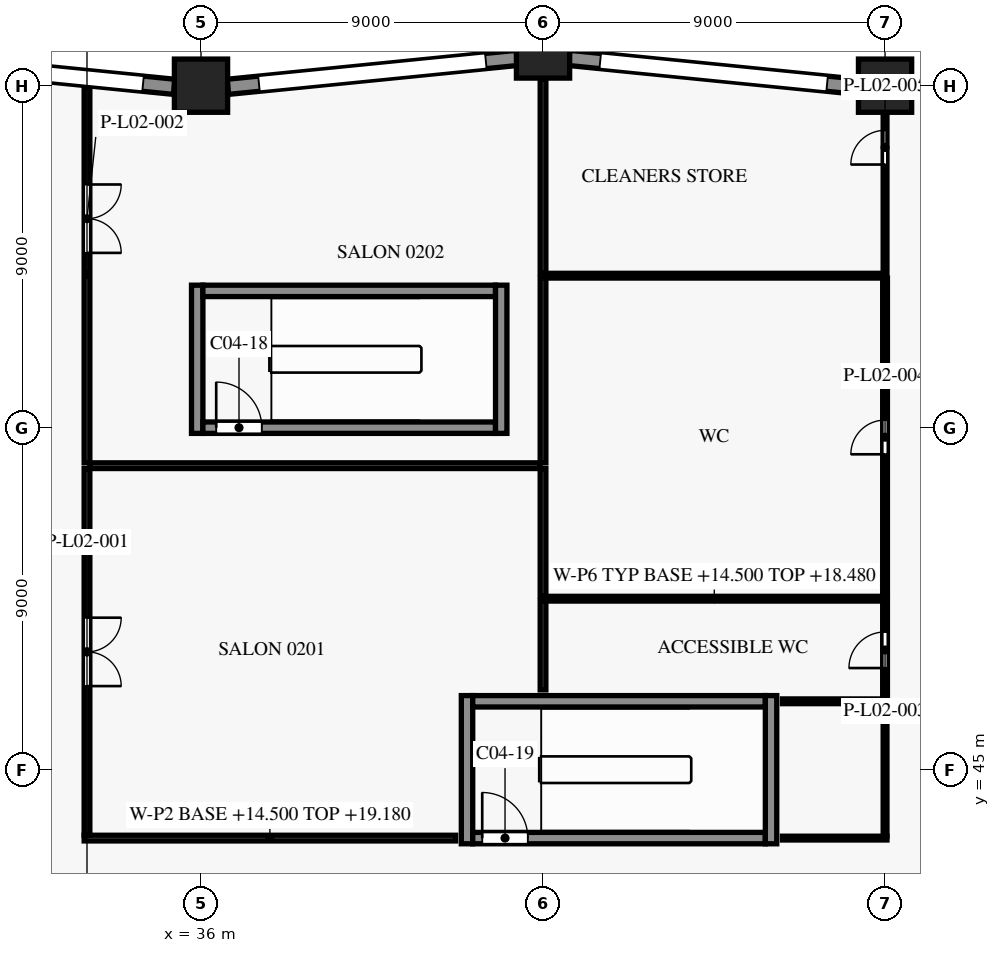
"""IFC4 building model, lengths in metres.
Left out: names, types, materials, properties, quantities, classifications, styles, units other than length and angle.
Written with IfcOpenShell. Run it as: python <this file> out.ifc"""

import sys

from ifc_helpers import new_model, si_unit, direction, frame, frame_2d, origin, origin_2d, place, context, subcontext, project, spatial, rectangle, extrude, element, fill, save


model = new_model("IFC4")
c1 = context("Model", 3, precision=1e-05, world=origin(), true_north=direction((0.0, 1.0)))
c2 = subcontext(c1, "Body", "Model", "MODEL_VIEW")
j1 = project(units=[si_unit("LENGTHUNIT", "METRE"), si_unit("PLANEANGLEUNIT", "RADIAN")], contexts=[c1])
p1 = place(None, origin())
s1 = spatial("IfcSite", under=j1, at=p1, CompositionType="ELEMENT")
p2 = place(p1, origin())
s2 = spatial("IfcBuilding", under=s1, at=p2, CompositionType="ELEMENT")
p3 = place(p2, frame((0.0, 0.0, 14.5)))
s3 = spatial("IfcBuildingStorey", under=s2, at=p3, CompositionType="ELEMENT", Elevation=14.5)
for number, where, z_axis, x_axis in (
    (1, (54.0, 63.0, 0.0), (0.0, 0.0, 1.0), (1.0, 0.0, 0.0)),
    (2, (45.0, 63.9, 0.0), (0.0, 0.0, 1.0), (1.0, 0.0, 0.0)),
    (3, (36.0, 63.0, 0.0), (0.0, 0.0, 1.0), (1.0, 0.0, 0.0)),
):
    element("IfcColumn", number, at=place(p3, frame(where, z_axis=z_axis, x_axis=x_axis)), inside=s3, PredefinedType="COLUMN", context=c2, shape_type="SweptSolid", body=[
        extrude(rectangle(XDim=1.4, YDim=1.4, at=origin_2d()), origin(), (0.0, 0.0, 1.0), 5.0),
    ])
p4 = place(p3, frame((54.707, 62.97, 0.0), z_axis=(0.0, 0.0, 1.0), x_axis=(0.995039719416, 0.099478423711, 0.0)))
e4 = element("IfcWall", 4, at=p4, inside=s3, PredefinedType="SOLIDWALL", context=c2, shape_type="SweptSolid", body=[
    extrude(rectangle(XDim=7.645, YDim=0.4, at=frame_2d((3.822, 0.0))), origin(), (0.0, 0.0, 1.0), 4.1),
])
p5 = place(p4, frame((0.823, 0.0, 0.9)))
e5 = element("IfcOpeningElement", 5, at=p5, cuts=e4, PredefinedType="OPENING", context=c2, shape_type="SweptSolid", body=[
    extrude(rectangle(XDim=6.0, YDim=1.8, at=frame_2d((3.0, 0.9))), frame((0.0, 0.21, 0.0), z_axis=(0.0, -1.0, 0.0), x_axis=(1.0, 0.0, 0.0)), (0.0, 0.0, 1.0), 0.42),
])
p6 = place(p3, frame((45.687, 63.731, 0.0), z_axis=(0.0, 0.0, 1.0), x_axis=(0.995039719416, -0.099478423711, 0.0)))
e6 = element("IfcWall", 6, at=p6, inside=s3, PredefinedType="SOLIDWALL", context=c2, shape_type="SweptSolid", body=[
    extrude(rectangle(XDim=7.645, YDim=0.4, at=frame_2d((3.822, 0.0))), origin(), (0.0, 0.0, 1.0), 4.1),
])
p7 = place(p6, frame((0.823, 0.0, 0.9)))
e7 = element("IfcOpeningElement", 7, at=p7, cuts=e6, PredefinedType="OPENING", context=c2, shape_type="SweptSolid", body=[
    extrude(rectangle(XDim=6.0, YDim=1.8, at=frame_2d((3.0, 0.9))), frame((0.0, 0.21, 0.0), z_axis=(0.0, -1.0, 0.0), x_axis=(1.0, 0.0, 0.0)), (0.0, 0.0, 1.0), 0.42),
])
p8 = place(p3, frame((36.707, 62.97, 0.0), z_axis=(0.0, 0.0, 1.0), x_axis=(0.995039719416, 0.099478423711, 0.0)))
e8 = element("IfcWall", 8, at=p8, inside=s3, PredefinedType="SOLIDWALL", context=c2, shape_type="SweptSolid", body=[
    extrude(rectangle(XDim=7.645, YDim=0.4, at=frame_2d((3.822, 0.0))), origin(), (0.0, 0.0, 1.0), 4.1),
])
p9 = place(p8, frame((0.823, 0.0, 0.9)))
e9 = element("IfcOpeningElement", 9, at=p9, cuts=e8, PredefinedType="OPENING", context=c2, shape_type="SweptSolid", body=[
    extrude(rectangle(XDim=6.0, YDim=1.8, at=frame_2d((3.0, 0.9))), frame((0.0, 0.21, 0.0), z_axis=(0.0, -1.0, 0.0), x_axis=(1.0, 0.0, 0.0)), (0.0, 0.0, 1.0), 0.42),
])
p10 = place(p3, frame((27.687, 63.731, 0.0), z_axis=(0.0, 0.0, 1.0), x_axis=(0.995039719416, -0.099478423711, 0.0)))
e10 = element("IfcWall", 10, at=p10, inside=s3, PredefinedType="SOLIDWALL", context=c2, shape_type="SweptSolid", body=[
    extrude(rectangle(XDim=7.645, YDim=0.4, at=frame_2d((3.822, 0.0))), origin(), (0.0, 0.0, 1.0), 4.1),
])
p11 = place(p10, frame((0.823, 0.0, 0.9)))
e11 = element("IfcOpeningElement", 11, at=p11, cuts=e10, PredefinedType="OPENING", context=c2, shape_type="SweptSolid", body=[
    extrude(rectangle(XDim=6.0, YDim=1.8, at=frame_2d((3.0, 0.9))), frame((0.0, 0.21, 0.0), z_axis=(0.0, -1.0, 0.0), x_axis=(1.0, 0.0, 0.0)), (0.0, 0.0, 1.0), 0.42),
])
p12 = place(p3, frame((43.15, 43.2, 0.0), z_axis=(0.0, 0.0, 1.0), x_axis=(1.0, 0.0, 0.0)))
e12 = element("IfcWall", 12, at=p12, inside=s3, PredefinedType="SHEAR", context=c2, shape_type="SweptSolid", body=[
    extrude(rectangle(XDim=7.7, YDim=0.3, at=frame_2d((3.85, 0.0))), origin(), (0.0, 0.0, 1.0), 4.7),
])
p13 = place(p12, frame((0.25, 0.0, 0.0)))
e13 = element("IfcOpeningElement", 13, at=p13, cuts=e12, PredefinedType="OPENING", context=c2, shape_type="SweptSolid", body=[
    extrude(rectangle(XDim=1.2, YDim=2.2, at=frame_2d((0.6, 1.1))), frame((0.0, 0.16, 0.0), z_axis=(0.0, -1.0, 0.0), x_axis=(1.0, 0.0, 0.0)), (0.0, 0.0, 1.0), 0.32),
])
p14 = place(p3, frame((43.15, 46.8, 0.0), z_axis=(0.0, 0.0, 1.0), x_axis=(1.0, 0.0, 0.0)))
e14 = element("IfcWall", 14, at=p14, inside=s3, PredefinedType="SHEAR", context=c2, shape_type="SweptSolid", body=[
    extrude(rectangle(XDim=7.7, YDim=0.3, at=frame_2d((3.85, 0.0))), origin(), (0.0, 0.0, 1.0), 4.7),
])
p15 = place(p3, frame((36.05, 54.0, 0.0), z_axis=(0.0, 0.0, 1.0), x_axis=(1.0, 0.0, 0.0)))
e15 = element("IfcWall", 15, at=p15, inside=s3, PredefinedType="SHEAR", context=c2, shape_type="SweptSolid", body=[
    extrude(rectangle(XDim=7.7, YDim=0.3, at=frame_2d((3.85, 0.0))), origin(), (0.0, 0.0, 1.0), 4.7),
])
p16 = place(p15, frame((0.35, 0.0, 0.0)))
e16 = element("IfcOpeningElement", 16, at=p16, cuts=e15, PredefinedType="OPENING", context=c2, shape_type="SweptSolid", body=[
    extrude(rectangle(XDim=1.2, YDim=2.2, at=frame_2d((0.6, 1.1))), frame((0.0, 0.16, 0.0), z_axis=(0.0, -1.0, 0.0), x_axis=(1.0, 0.0, 0.0)), (0.0, 0.0, 1.0), 0.32),
])
p17 = place(p3, frame((36.05, 57.6, 0.0), z_axis=(0.0, 0.0, 1.0), x_axis=(1.0, 0.0, 0.0)))
e17 = element("IfcWall", 17, at=p17, inside=s3, PredefinedType="SHEAR", context=c2, shape_type="SweptSolid", body=[
    extrude(rectangle(XDim=7.7, YDim=0.3, at=frame_2d((3.85, 0.0))), origin(), (0.0, 0.0, 1.0), 4.7),
])
for number, where, z_axis, x_axis in (
    (18, (35.9, 53.85, 0.0), (0.0, 0.0, 1.0), (0.0, 1.0, 0.0)),
    (19, (43.0, 43.05, 0.0), (0.0, 0.0, 1.0), (0.0, 1.0, 0.0)),
    (20, (43.9, 53.85, 0.0), (0.0, 0.0, 1.0), (0.0, 1.0, 0.0)),
    (21, (51.0, 43.05, 0.0), (0.0, 0.0, 1.0), (0.0, 1.0, 0.0)),
):
    element("IfcWall", number, at=place(p3, frame(where, z_axis=z_axis, x_axis=x_axis)), inside=s3, PredefinedType="SHEAR", context=c2, shape_type="SweptSolid", body=[
        extrude(rectangle(XDim=3.9, YDim=0.3, at=frame_2d((1.95, 0.0))), origin(), (0.0, 0.0, 1.0), 4.7),
    ])
p18 = place(p3, frame((32.925, 43.2, 0.0), z_axis=(0.0, 0.0, 1.0), x_axis=(1.0, 0.0, 0.0)))
e22 = element("IfcWall", 22, at=p18, inside=s3, PredefinedType="PARTITIONING", context=c2, shape_type="SweptSolid", body=[
    extrude(rectangle(XDim=9.775, YDim=0.15, at=frame_2d((4.887, 0.0))), origin(), (0.0, 0.0, 1.0), 4.68),
])
p19 = place(p3, frame((51.3, 43.2, 0.0), z_axis=(0.0, 0.0, 1.0), x_axis=(1.0, 0.0, 0.0)))
e23 = element("IfcWall", 23, at=p19, inside=s3, PredefinedType="PARTITIONING", context=c2, shape_type="SweptSolid", body=[
    extrude(rectangle(XDim=2.75, YDim=0.1, at=frame_2d((1.375, 0.0))), origin(), (0.0, 0.0, 1.0), 3.98),
])
p20 = place(p3, frame((54.0, 43.25, 0.0), z_axis=(0.0, 0.0, 1.0), x_axis=(0.0, 1.0, 0.0)))
e24 = element("IfcWall", 24, at=p20, inside=s3, PredefinedType="PARTITIONING", context=c2, shape_type="SweptSolid", body=[
    extrude(rectangle(XDim=3.488, YDim=0.1, at=frame_2d((1.744, 0.0))), origin(), (0.0, 0.0, 1.0), 3.98),
])
p21 = place(p3, frame((53.938, 46.8, 0.0), z_axis=(0.0, 0.0, 1.0), x_axis=(-1.0, 0.0, 0.0)))
e25 = element("IfcWall", 25, at=p21, inside=s3, PredefinedType="PARTITIONING", context=c2, shape_type="SweptSolid", body=[
    extrude(rectangle(XDim=2.637, YDim=0.125, at=frame_2d((1.319, 0.0))), origin(), (0.0, 0.0, 1.0), 3.98),
])
p22 = place(p3, frame((54.0, 46.863, 0.0), z_axis=(0.0, 0.0, 1.0), x_axis=(0.0, 1.0, 0.0)))
e26 = element("IfcWall", 26, at=p22, inside=s3, PredefinedType="PARTITIONING", context=c2, shape_type="SweptSolid", body=[
    extrude(rectangle(XDim=2.575, YDim=0.125, at=frame_2d((1.288, 0.0))), origin(), (0.0, 0.0, 1.0), 3.98),
])
p23 = place(p22, frame((0.812, 0.0, 0.0)))
e27 = element("IfcOpeningElement", 27, at=p23, cuts=e26, PredefinedType="OPENING", context=c2, shape_type="SweptSolid", body=[
    extrude(rectangle(XDim=0.95, YDim=2.1, at=frame_2d((0.475, 1.05))), frame((0.0, 0.073, 0.0), z_axis=(0.0, -1.0, 0.0), x_axis=(1.0, 0.0, 0.0)), (0.0, 0.0, 1.0), 0.145),
])
p24 = place(p3, frame((45.0, 49.438, 0.0), z_axis=(0.0, 0.0, 1.0), x_axis=(0.0, -1.0, 0.0)))
e28 = element("IfcWall", 28, at=p24, inside=s3, PredefinedType="PARTITIONING", context=c2, shape_type="SweptSolid", body=[
    extrude(rectangle(XDim=2.337, YDim=0.15, at=frame_2d((1.169, 0.0))), origin(), (0.0, 0.0, 1.0), 3.98),
])
p25 = place(p3, frame((45.075, 49.5, 0.0), z_axis=(0.0, 0.0, 1.0), x_axis=(1.0, 0.0, 0.0)))
e29 = element("IfcWall", 29, at=p25, inside=s3, PredefinedType="PARTITIONING", context=c2, shape_type="SweptSolid", body=[
    extrude(rectangle(XDim=8.863, YDim=0.125, at=frame_2d((4.431, 0.0))), origin(), (0.0, 0.0, 1.0), 3.98),
])
p26 = place(p3, frame((54.0, 49.562, 0.0), z_axis=(0.0, 0.0, 1.0), x_axis=(0.0, 1.0, 0.0)))
e30 = element("IfcWall", 30, at=p26, inside=s3, PredefinedType="PARTITIONING", context=c2, shape_type="SweptSolid", body=[
    extrude(rectangle(XDim=8.375, YDim=0.125, at=frame_2d((4.188, 0.0))), origin(), (0.0, 0.0, 1.0), 3.98),
])
p27 = place(p26, frame((3.738, 0.0, 0.0)))
e31 = element("IfcOpeningElement", 31, at=p27, cuts=e30, PredefinedType="OPENING", context=c2, shape_type="SweptSolid", body=[
    extrude(rectangle(XDim=0.9, YDim=2.1, at=frame_2d((0.45, 1.05))), frame((0.0, 0.073, 0.0), z_axis=(0.0, -1.0, 0.0), x_axis=(1.0, 0.0, 0.0)), (0.0, 0.0, 1.0), 0.145),
])
p28 = place(p3, frame((33.0, 52.925, 0.0), z_axis=(0.0, 0.0, 1.0), x_axis=(0.0, -1.0, 0.0)))
e32 = element("IfcWall", 32, at=p28, inside=s3, PredefinedType="PARTITIONING", context=c2, shape_type="SweptSolid", body=[
    extrude(rectangle(XDim=9.65, YDim=0.15, at=frame_2d((4.825, 0.0))), origin(), (0.0, 0.0, 1.0), 4.68),
])
p29 = place(p28, frame((3.925, 0.0, 0.0)))
e33 = element("IfcOpeningElement", 33, at=p29, cuts=e32, PredefinedType="OPENING", context=c2, shape_type="SweptSolid", body=[
    extrude(rectangle(XDim=1.8, YDim=2.1, at=frame_2d((0.9, 1.05))), frame((0.0, 0.085, 0.0), z_axis=(0.0, -1.0, 0.0), x_axis=(1.0, 0.0, 0.0)), (0.0, 0.0, 1.0), 0.17),
])
p30 = place(p3, frame((45.0, 52.925, 0.0), z_axis=(0.0, 0.0, 1.0), x_axis=(0.0, -1.0, 0.0)))
e34 = element("IfcWall", 34, at=p30, inside=s3, PredefinedType="PARTITIONING", context=c2, shape_type="SweptSolid", body=[
    extrude(rectangle(XDim=3.363, YDim=0.15, at=frame_2d((1.681, 0.0))), origin(), (0.0, 0.0, 1.0), 3.98),
])
p31 = place(p3, frame((33.075, 53.0, 0.0), z_axis=(0.0, 0.0, 1.0), x_axis=(1.0, 0.0, 0.0)))
e35 = element("IfcWall", 35, at=p31, inside=s3, PredefinedType="PARTITIONING", context=c2, shape_type="SweptSolid", body=[
    extrude(rectangle(XDim=11.85, YDim=0.15, at=frame_2d((5.925, 0.0))), origin(), (0.0, 0.0, 1.0), 3.98),
])
p32 = place(p3, frame((45.0, 57.938, 0.0), z_axis=(0.0, 0.0, 1.0), x_axis=(0.0, -1.0, 0.0)))
e36 = element("IfcWall", 36, at=p32, inside=s3, PredefinedType="PARTITIONING", context=c2, shape_type="SweptSolid", body=[
    extrude(rectangle(XDim=4.863, YDim=0.15, at=frame_2d((2.431, 0.0))), origin(), (0.0, 0.0, 1.0), 3.98),
])
p33 = place(p3, frame((45.075, 58.0, 0.0), z_axis=(0.0, 0.0, 1.0), x_axis=(1.0, 0.0, 0.0)))
e37 = element("IfcWall", 37, at=p33, inside=s3, PredefinedType="PARTITIONING", context=c2, shape_type="SweptSolid", body=[
    extrude(rectangle(XDim=8.863, YDim=0.125, at=frame_2d((4.431, 0.0))), origin(), (0.0, 0.0, 1.0), 3.98),
])
p34 = place(p3, frame((54.0, 58.062, 0.0), z_axis=(0.0, 0.0, 1.0), x_axis=(0.0, 1.0, 0.0)))
e38 = element("IfcWall", 38, at=p34, inside=s3, PredefinedType="PARTITIONING", context=c2, shape_type="SweptSolid", body=[
    extrude(rectangle(XDim=4.218, YDim=0.1, at=frame_2d((2.109, 0.0))), origin(), (0.0, 0.0, 1.0), 3.98),
])
p35 = place(p34, frame((2.863, 0.0, 0.0)))
e39 = element("IfcOpeningElement", 39, at=p35, cuts=e38, PredefinedType="OPENING", context=c2, shape_type="SweptSolid", body=[
    extrude(rectangle(XDim=0.9, YDim=2.1, at=frame_2d((0.45, 1.05))), frame((0.0, 0.06, 0.0), z_axis=(0.0, -1.0, 0.0), x_axis=(1.0, 0.0, 0.0)), (0.0, 0.0, 1.0), 0.12),
])
p36 = place(p3, frame((33.0, 62.979, 0.0), z_axis=(0.0, 0.0, 1.0), x_axis=(0.0, -1.0, 0.0)))
e40 = element("IfcWall", 40, at=p36, inside=s3, PredefinedType="PARTITIONING", context=c2, shape_type="SweptSolid", body=[
    extrude(rectangle(XDim=9.904, YDim=0.15, at=frame_2d((4.952, 0.0))), origin(), (0.0, 0.0, 1.0), 4.68),
])
p37 = place(p36, frame((2.579, 0.0, 0.0)))
e41 = element("IfcOpeningElement", 41, at=p37, cuts=e40, PredefinedType="OPENING", context=c2, shape_type="SweptSolid", body=[
    extrude(rectangle(XDim=1.8, YDim=2.1, at=frame_2d((0.9, 1.05))), frame((0.0, 0.085, 0.0), z_axis=(0.0, -1.0, 0.0), x_axis=(1.0, 0.0, 0.0)), (0.0, 0.0, 1.0), 0.17),
])
p38 = place(p3, frame((45.0, 63.18, 0.0), z_axis=(0.0, 0.0, 1.0), x_axis=(0.0, -1.0, 0.0)))
e42 = element("IfcWall", 42, at=p38, inside=s3, PredefinedType="PARTITIONING", context=c2, shape_type="SweptSolid", body=[
    extrude(rectangle(XDim=5.117, YDim=0.15, at=frame_2d((2.559, 0.0))), origin(), (0.0, 0.0, 1.0), 3.98),
])
p39 = place(p7, origin())
e43 = element("IfcWindow", 43, at=p39, inside=s3, PartitioningType="SINGLE_PANEL", PredefinedType="WINDOW", context=c2, shape_type="SweptSolid", body=[
    extrude(rectangle(XDim=6.0, YDim=1.8, at=frame_2d((3.0, 0.9))), frame((0.0, 0.03, 0.0), z_axis=(0.0, -1.0, 0.0), x_axis=(1.0, 0.0, 0.0)), (0.0, 0.0, 1.0), 0.06),
])
fill(e7, e43)
p40 = place(p9, origin())
e44 = element("IfcWindow", 44, at=p40, inside=s3, PartitioningType="SINGLE_PANEL", PredefinedType="WINDOW", context=c2, shape_type="SweptSolid", body=[
    extrude(rectangle(XDim=6.0, YDim=1.8, at=frame_2d((3.0, 0.9))), frame((0.0, 0.03, 0.0), z_axis=(0.0, -1.0, 0.0), x_axis=(1.0, 0.0, 0.0)), (0.0, 0.0, 1.0), 0.06),
])
fill(e9, e44)
p41 = place(p11, origin())
e45 = element("IfcWindow", 45, at=p41, inside=s3, PartitioningType="SINGLE_PANEL", PredefinedType="WINDOW", context=c2, shape_type="SweptSolid", body=[
    extrude(rectangle(XDim=6.0, YDim=1.8, at=frame_2d((3.0, 0.9))), frame((0.0, 0.03, 0.0), z_axis=(0.0, -1.0, 0.0), x_axis=(1.0, 0.0, 0.0)), (0.0, 0.0, 1.0), 0.06),
])
fill(e11, e45)
p42 = place(p16, origin())
e46 = element("IfcDoor", 46, at=p42, inside=s3, OperationType="SINGLE_SWING_LEFT", PredefinedType="DOOR", context=c2, shape_type="SweptSolid", body=[
    extrude(rectangle(XDim=1.2, YDim=2.2, at=frame_2d((0.6, 1.1))), frame((0.0, 0.025, 0.0), z_axis=(0.0, -1.0, 0.0), x_axis=(1.0, 0.0, 0.0)), (0.0, 0.0, 1.0), 0.05),
])
fill(e16, e46)
p43 = place(p13, origin())
e47 = element("IfcDoor", 47, at=p43, inside=s3, OperationType="SINGLE_SWING_RIGHT", PredefinedType="DOOR", context=c2, shape_type="SweptSolid", body=[
    extrude(rectangle(XDim=1.2, YDim=2.2, at=frame_2d((0.6, 1.1))), frame((0.0, 0.025, 0.0), z_axis=(0.0, -1.0, 0.0), x_axis=(1.0, 0.0, 0.0)), (0.0, 0.0, 1.0), 0.05),
])
fill(e13, e47)
p44 = place(p29, origin())
e48 = element("IfcDoor", 48, at=p44, inside=s3, OperationType="DOUBLE_DOOR_SINGLE_SWING", PredefinedType="DOOR", context=c2, shape_type="SweptSolid", body=[
    extrude(rectangle(XDim=1.8, YDim=2.1, at=frame_2d((0.9, 1.05))), frame((0.0, 0.025, 0.0), z_axis=(0.0, -1.0, 0.0), x_axis=(1.0, 0.0, 0.0)), (0.0, 0.0, 1.0), 0.05),
])
fill(e33, e48)
p45 = place(p37, origin())
e49 = element("IfcDoor", 49, at=p45, inside=s3, OperationType="DOUBLE_DOOR_SINGLE_SWING", PredefinedType="DOOR", context=c2, shape_type="SweptSolid", body=[
    extrude(rectangle(XDim=1.8, YDim=2.1, at=frame_2d((0.9, 1.05))), frame((0.0, 0.025, 0.0), z_axis=(0.0, -1.0, 0.0), x_axis=(1.0, 0.0, 0.0)), (0.0, 0.0, 1.0), 0.05),
])
fill(e41, e49)
p46 = place(p23, origin())
e50 = element("IfcDoor", 50, at=p46, inside=s3, OperationType="SINGLE_SWING_RIGHT", PredefinedType="DOOR", context=c2, shape_type="SweptSolid", body=[
    extrude(rectangle(XDim=0.95, YDim=2.1, at=frame_2d((0.475, 1.05))), frame((0.0, 0.025, 0.0), z_axis=(0.0, -1.0, 0.0), x_axis=(1.0, 0.0, 0.0)), (0.0, 0.0, 1.0), 0.05),
])
fill(e27, e50)
p47 = place(p27, origin())
e51 = element("IfcDoor", 51, at=p47, inside=s3, OperationType="SINGLE_SWING_RIGHT", PredefinedType="DOOR", context=c2, shape_type="SweptSolid", body=[
    extrude(rectangle(XDim=0.9, YDim=2.1, at=frame_2d((0.45, 1.05))), frame((0.0, 0.025, 0.0), z_axis=(0.0, -1.0, 0.0), x_axis=(1.0, 0.0, 0.0)), (0.0, 0.0, 1.0), 0.05),
])
fill(e31, e51)
p48 = place(p35, origin())
e52 = element("IfcDoor", 52, at=p48, inside=s3, OperationType="SINGLE_SWING_RIGHT", PredefinedType="DOOR", context=c2, shape_type="SweptSolid", body=[
    extrude(rectangle(XDim=0.9, YDim=2.1, at=frame_2d((0.45, 1.05))), frame((0.0, 0.025, 0.0), z_axis=(0.0, -1.0, 0.0), x_axis=(1.0, 0.0, 0.0)), (0.0, 0.0, 1.0), 0.05),
])
fill(e39, e52)
save(model, sys.argv[1])
